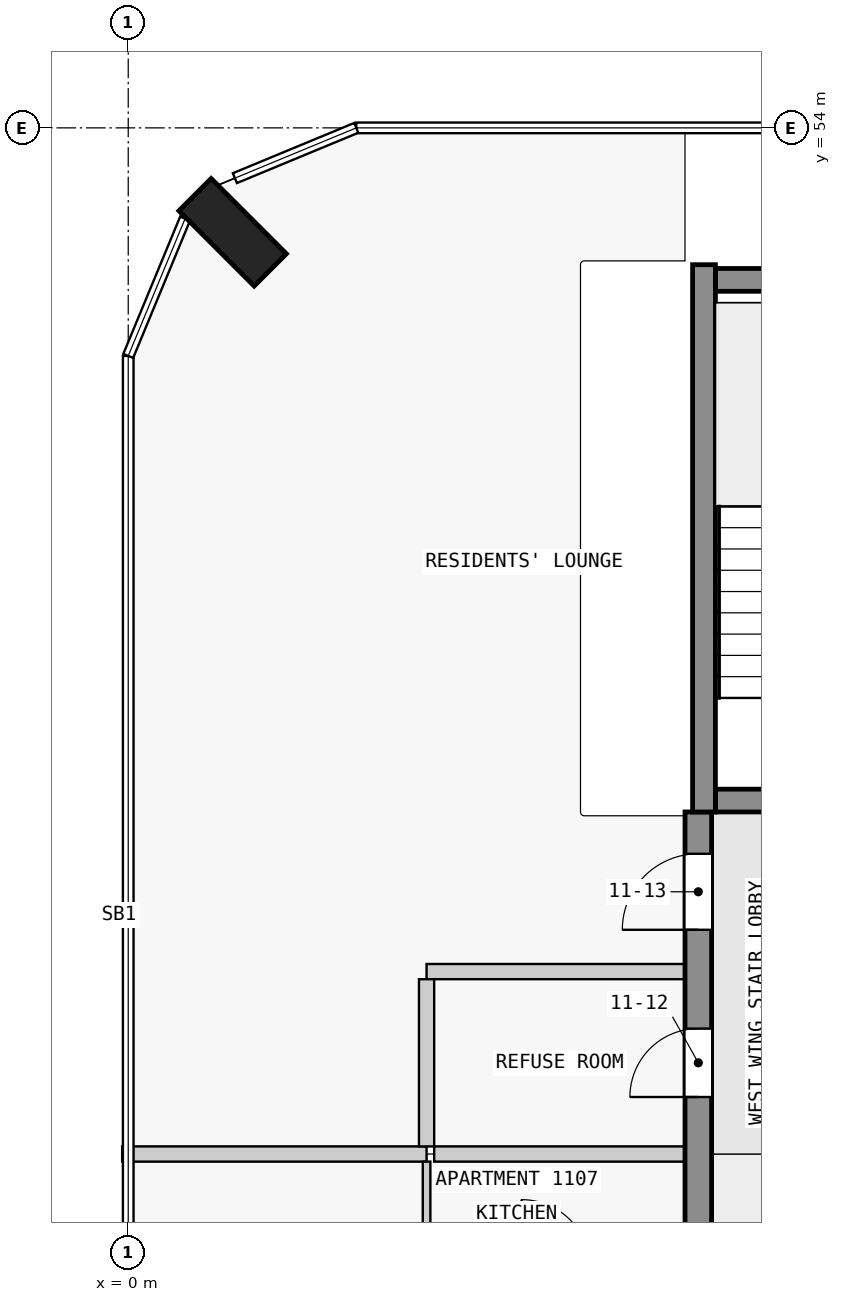
"""IFC4 building model, lengths in metres.
Left out: names, types, materials, properties, quantities, classifications, styles, units other than length and angle.
Written with IfcOpenShell. Run it as: python <this file> out.ifc"""

import sys

from ifc_helpers import new_model, si_unit, direction, frame, frame_2d, origin, origin_2d, place, context, subcontext, project, spatial, rectangle, extrude, element, fill, save


model = new_model("IFC4")
c1 = context("Model", 3, precision=1e-05, world=origin(), true_north=direction((0.0, 1.0)))
c2 = subcontext(c1, "Body", "Model", "MODEL_VIEW")
j1 = project(units=[si_unit("LENGTHUNIT", "METRE"), si_unit("PLANEANGLEUNIT", "RADIAN")], contexts=[c1])
p1 = place(None, origin())
s1 = spatial("IfcSite", under=j1, at=p1, CompositionType="ELEMENT")
p2 = place(p1, origin())
s2 = spatial("IfcBuilding", under=s1, at=p2, CompositionType="ELEMENT")
p3 = place(p2, frame((0.0, 0.0, 47.8)))
s3 = spatial("IfcBuildingStorey", under=s2, at=p3, CompositionType="ELEMENT", Elevation=47.8)
p4 = place(p3, frame((1.374, 52.626, 0.0), z_axis=(0.0, 0.0, 1.0), x_axis=(0.707106781187, 0.707106781187, 0.0)))
e1 = element("IfcColumn", 1, at=p4, inside=s3, PredefinedType="COLUMN", context=c2, shape_type="SweptSolid", body=[
    extrude(rectangle(XDim=0.6, YDim=1.4, at=origin_2d()), origin(), (0.0, 0.0, 1.0), 3.5),
])
p5 = place(p3, frame((7.725, 45.15, 0.0), z_axis=(0.0, 0.0, 1.0), x_axis=(1.0, 0.0, 0.0)))
e2 = element("IfcWall", 2, at=p5, inside=s3, PredefinedType="SHEAR", context=c2, shape_type="SweptSolid", body=[
    extrude(rectangle(XDim=2.55, YDim=0.3, at=frame_2d((1.275, 0.0))), origin(), (0.0, 0.0, 1.0), 3.5),
])
p6 = place(p5, frame((0.725, 0.0, 0.0)))
e3 = element("IfcOpeningElement", 3, at=p6, cuts=e2, PredefinedType="OPENING", context=c2, shape_type="SweptSolid", body=[
    extrude(rectangle(XDim=1.1, YDim=2.1, at=frame_2d((0.55, 1.05))), frame((0.0, 0.16, 0.0), z_axis=(0.0, -1.0, 0.0), x_axis=(1.0, 0.0, 0.0)), (0.0, 0.0, 1.0), 0.32),
])
p7 = place(p3, frame((7.725, 52.0, 0.0), z_axis=(0.0, 0.0, 1.0), x_axis=(1.0, 0.0, 0.0)))
e4 = element("IfcWall", 4, at=p7, inside=s3, PredefinedType="SHEAR", context=c2, shape_type="SweptSolid", body=[
    extrude(rectangle(XDim=2.55, YDim=0.3, at=frame_2d((1.275, 0.0))), origin(), (0.0, 0.0, 1.0), 3.5),
])
p8 = place(p3, frame((7.575, 45.0, 0.0), z_axis=(0.0, 0.0, 1.0), x_axis=(0.0, 1.0, 0.0)))
e5 = element("IfcWall", 5, at=p8, inside=s3, PredefinedType="SHEAR", context=c2, shape_type="SweptSolid", body=[
    extrude(rectangle(XDim=7.2, YDim=0.3, at=frame_2d((3.6, 0.0))), origin(), (0.0, 0.0, 1.0), 3.5),
])
p9 = place(p3, frame((7.5, 18.0, 0.0), z_axis=(0.0, 0.0, 1.0), x_axis=(0.0, 1.0, 0.0)))
e6 = element("IfcWall", 6, at=p9, inside=s3, PredefinedType="SHEAR", context=c2, shape_type="SweptSolid", body=[
    extrude(rectangle(XDim=27.0, YDim=0.35, at=frame_2d((13.5, 0.0))), origin(), (0.0, 0.0, 1.0), 3.25),
])
p10 = place(p9, frame((4.75, 0.0, 0.0)))
e7 = element("IfcOpeningElement", 7, at=p10, cuts=e6, PredefinedType="OPENING", context=c2, shape_type="SweptSolid", body=[
    extrude(rectangle(XDim=1.0, YDim=2.1, at=frame_2d((0.5, 1.05))), frame((0.0, 0.185, 0.0), z_axis=(0.0, -1.0, 0.0), x_axis=(1.0, 0.0, 0.0)), (0.0, 0.0, 1.0), 0.37),
])
p11 = place(p9, frame((15.25, 0.0, 0.0)))
e8 = element("IfcOpeningElement", 8, at=p11, cuts=e6, PredefinedType="OPENING", context=c2, shape_type="SweptSolid", body=[
    extrude(rectangle(XDim=1.0, YDim=2.1, at=frame_2d((0.5, 1.05))), frame((0.0, 0.185, 0.0), z_axis=(0.0, -1.0, 0.0), x_axis=(1.0, 0.0, 0.0)), (0.0, 0.0, 1.0), 0.37),
])
p12 = place(p9, frame((19.75, 0.0, 0.0)))
e9 = element("IfcOpeningElement", 9, at=p12, cuts=e6, PredefinedType="OPENING", context=c2, shape_type="SweptSolid", body=[
    extrude(rectangle(XDim=1.0, YDim=2.1, at=frame_2d((0.5, 1.05))), frame((0.0, 0.185, 0.0), z_axis=(0.0, -1.0, 0.0), x_axis=(1.0, 0.0, 0.0)), (0.0, 0.0, 1.0), 0.37),
])
p13 = place(p9, frame((23.25, 0.0, 0.0)))
e10 = element("IfcOpeningElement", 10, at=p13, cuts=e6, PredefinedType="OPENING", context=c2, shape_type="SweptSolid", body=[
    extrude(rectangle(XDim=0.9, YDim=2.1, at=frame_2d((0.45, 1.05))), frame((0.0, 0.185, 0.0), z_axis=(0.0, -1.0, 0.0), x_axis=(1.0, 0.0, 0.0)), (0.0, 0.0, 1.0), 0.37),
])
p14 = place(p9, frame((25.45, 0.0, 0.0)))
e11 = element("IfcOpeningElement", 11, at=p14, cuts=e6, PredefinedType="OPENING", context=c2, shape_type="SweptSolid", body=[
    extrude(rectangle(XDim=1.0, YDim=2.1, at=frame_2d((0.5, 1.05))), frame((0.0, 0.185, 0.0), z_axis=(0.0, -1.0, 0.0), x_axis=(1.0, 0.0, 0.0)), (0.0, 0.0, 1.0), 0.37),
])
p15 = place(p3, frame((7.325, 40.5, 0.0), z_axis=(0.0, 0.0, 1.0), x_axis=(-1.0, 0.0, 0.0)))
e12 = element("IfcWall", 12, at=p15, inside=s3, PredefinedType="PARTITIONING", context=c2, shape_type="SweptSolid", body=[
    extrude(rectangle(XDim=3.3, YDim=0.2, at=frame_2d((1.65, 0.0))), origin(), (0.0, 0.0, 1.0), 3.25),
])
p16 = place(p3, frame((-0.08, 40.5, 0.0), z_axis=(0.0, 0.0, 1.0), x_axis=(1.0, 0.0, 0.0)))
e13 = element("IfcWall", 13, at=p16, inside=s3, PredefinedType="PARTITIONING", context=c2, shape_type="SweptSolid", body=[
    extrude(rectangle(XDim=4.005, YDim=0.2, at=frame_2d((2.002, 0.0))), origin(), (0.0, 0.0, 1.0), 3.25),
])
p17 = place(p3, frame((7.325, 42.9, 0.0), z_axis=(0.0, 0.0, 1.0), x_axis=(-1.0, 0.0, 0.0)))
e14 = element("IfcWall", 14, at=p17, inside=s3, PredefinedType="PARTITIONING", context=c2, shape_type="SweptSolid", body=[
    extrude(rectangle(XDim=3.4, YDim=0.2, at=frame_2d((1.7, 0.0))), origin(), (0.0, 0.0, 1.0), 3.25),
])
p18 = place(p3, frame((3.925, 40.4, 0.0), z_axis=(0.0, 0.0, 1.0), x_axis=(0.0, -1.0, 0.0)))
e15 = element("IfcWall", 15, at=p18, inside=s3, PredefinedType="PARTITIONING", context=c2, shape_type="SweptSolid", body=[
    extrude(rectangle(XDim=1.35, YDim=0.1, at=frame_2d((0.675, 0.0))), origin(), (0.0, 0.0, 1.0), 3.25),
])
p19 = place(p3, frame((3.925, 42.8, 0.0), z_axis=(0.0, 0.0, 1.0), x_axis=(0.0, -1.0, 0.0)))
e16 = element("IfcWall", 16, at=p19, inside=s3, PredefinedType="PARTITIONING", context=c2, shape_type="SweptSolid", body=[
    extrude(rectangle(XDim=2.2, YDim=0.2, at=frame_2d((1.1, 0.0))), origin(), (0.0, 0.0, 1.0), 3.25),
])
p20 = place(p13, origin())
e17 = element("IfcDoor", 17, at=p20, inside=s3, OperationType="SINGLE_SWING_RIGHT", PredefinedType="DOOR", context=c2, shape_type="SweptSolid", body=[
    extrude(rectangle(XDim=0.9, YDim=2.1, at=frame_2d((0.45, 1.05))), frame((0.0, 0.025, 0.0), z_axis=(0.0, -1.0, 0.0), x_axis=(1.0, 0.0, 0.0)), (0.0, 0.0, 1.0), 0.05),
])
fill(e10, e17)
p21 = place(p14, origin())
e18 = element("IfcDoor", 18, at=p21, inside=s3, OperationType="SINGLE_SWING_RIGHT", PredefinedType="DOOR", context=c2, shape_type="SweptSolid", body=[
    extrude(rectangle(XDim=1.0, YDim=2.1, at=frame_2d((0.5, 1.05))), frame((0.0, 0.025, 0.0), z_axis=(0.0, -1.0, 0.0), x_axis=(1.0, 0.0, 0.0)), (0.0, 0.0, 1.0), 0.05),
])
fill(e11, e18)
save(model, sys.argv[1])
